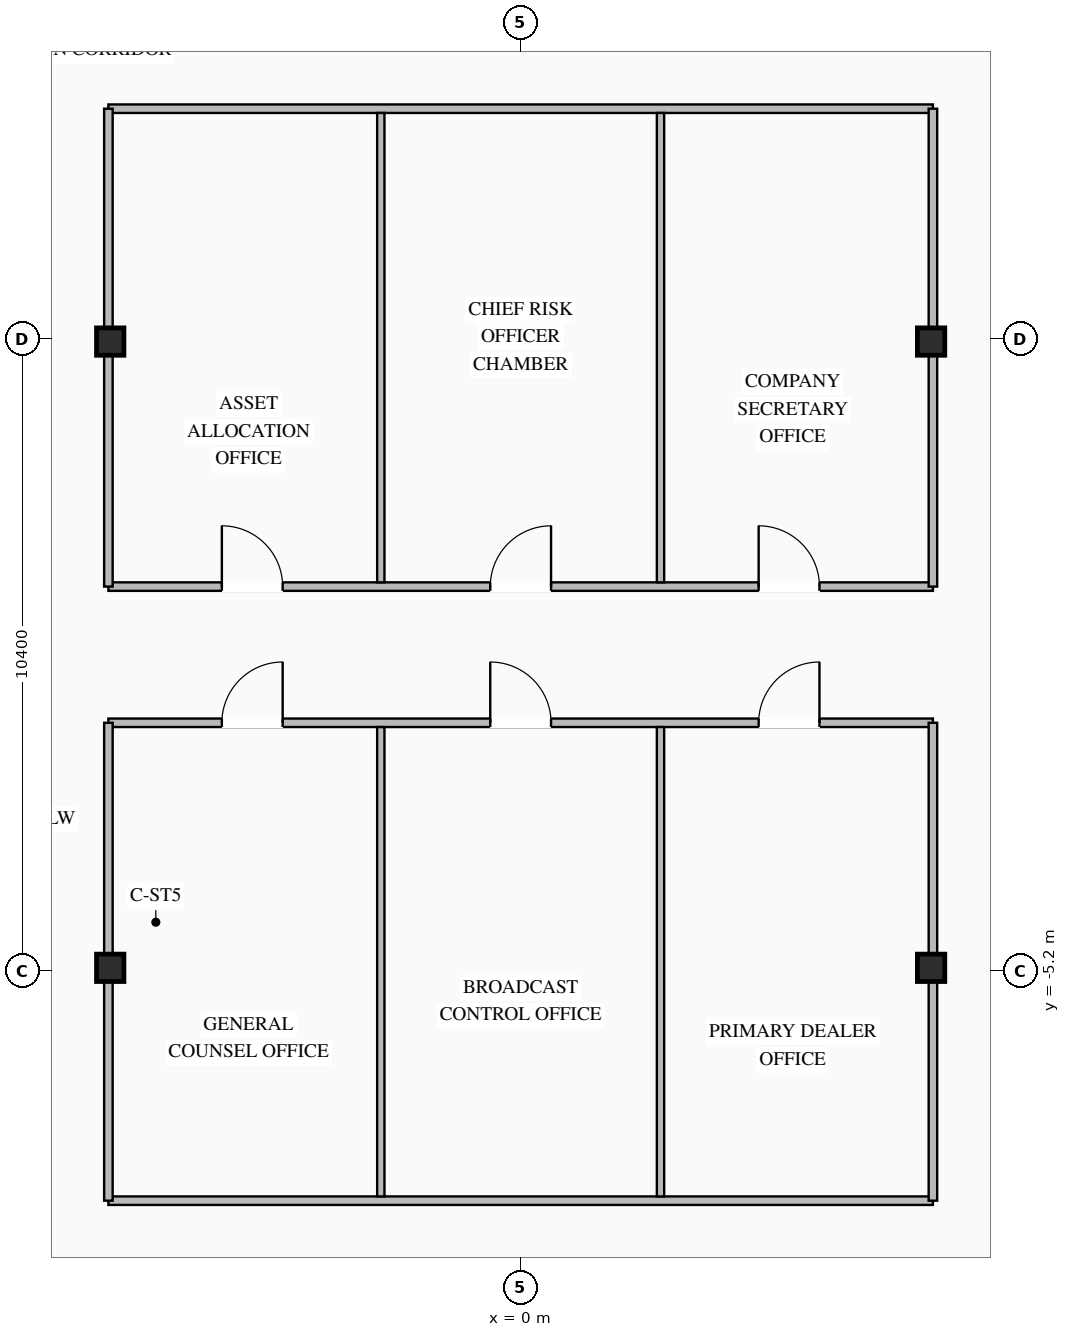
"""IFC4 building model, lengths in metres.
Left out: names, types, materials, properties, quantities, classifications, styles, units other than length and angle.
Written with IfcOpenShell. Run it as: python <this file> out.ifc"""

import sys

from ifc_helpers import new_model, si_unit, direction, frame, frame_2d, origin, origin_2d, place, context, subcontext, project, spatial, rectangle, i_section, extrude, element, fill, save


model = new_model("IFC4")
c1 = context("Model", 3, precision=1e-05, world=origin(), true_north=direction((0.0, 1.0)))
c2 = subcontext(c1, "Body", "Model", "MODEL_VIEW")
j1 = project(units=[si_unit("LENGTHUNIT", "METRE"), si_unit("PLANEANGLEUNIT", "RADIAN")], contexts=[c1])
p1 = place(None, origin())
s1 = spatial("IfcSite", under=j1, at=p1, CompositionType="ELEMENT")
p2 = place(p1, origin())
s2 = spatial("IfcBuilding", under=s1, at=p2, CompositionType="ELEMENT")
p3 = place(p2, frame((0.0, 0.0, 272.4)))
s3 = spatial("IfcBuildingStorey", under=s2, at=p3, CompositionType="ELEMENT", Elevation=272.4)
for number, where, z_axis, x_axis in (
    (1, (-6.75, -5.15, 0.0), (0.0, 0.0, 1.0), (1.0, 0.0, 0.0)),
    (2, (-6.75, 5.15, 0.0), (0.0, 0.0, 1.0), (1.0, 0.0, 0.0)),
    (3, (6.75, -5.15, 0.0), (0.0, 0.0, 1.0), (1.0, 0.0, 0.0)),
    (4, (6.75, 5.15, 0.0), (0.0, 0.0, 1.0), (1.0, 0.0, 0.0)),
):
    element("IfcColumn", number, at=place(p3, frame(where, z_axis=z_axis, x_axis=x_axis)), inside=s3, PredefinedType="COLUMN", context=c2, shape_type="SweptSolid", body=[
        extrude(i_section(OverallWidth=0.45, OverallDepth=0.45, WebThickness=0.022, FlangeThickness=0.032, at=origin_2d()), origin(), (0.0, 0.0, 1.0), 3.45),
    ])
p4 = place(p3, frame((-6.78, 1.12, 0.0), z_axis=(0.0, 0.0, 1.0), x_axis=(1.0, 0.0, 0.0)))
e5 = element("IfcWall", 5, at=p4, inside=s3, PredefinedType="STANDARD", context=c2, shape_type="SweptSolid", body=[
    extrude(rectangle(XDim=13.56, YDim=0.14, at=frame_2d((6.78, 0.0))), origin(), (0.0, 0.0, 1.0), 3.25),
])
p5 = place(p4, frame((1.866, 0.0, 0.0)))
e6 = element("IfcOpeningElement", 6, at=p5, cuts=e5, PredefinedType="OPENING", context=c2, shape_type="SweptSolid", body=[
    extrude(rectangle(XDim=1.0, YDim=2.08, at=frame_2d((0.5, 1.04))), frame((0.0, 0.08, 0.0), z_axis=(0.0, -1.0, 0.0), x_axis=(1.0, 0.0, 0.0)), (0.0, 0.0, 1.0), 0.16),
])
p6 = place(p4, frame((6.28, 0.0, 0.0)))
e7 = element("IfcOpeningElement", 7, at=p6, cuts=e5, PredefinedType="OPENING", context=c2, shape_type="SweptSolid", body=[
    extrude(rectangle(XDim=1.0, YDim=2.08, at=frame_2d((0.5, 1.04))), frame((0.0, 0.08, 0.0), z_axis=(0.0, -1.0, 0.0), x_axis=(1.0, 0.0, 0.0)), (0.0, 0.0, 1.0), 0.16),
])
p7 = place(p4, frame((10.694, 0.0, 0.0)))
e8 = element("IfcOpeningElement", 8, at=p7, cuts=e5, PredefinedType="OPENING", context=c2, shape_type="SweptSolid", body=[
    extrude(rectangle(XDim=1.0, YDim=2.08, at=frame_2d((0.5, 1.04))), frame((0.0, 0.08, 0.0), z_axis=(0.0, -1.0, 0.0), x_axis=(1.0, 0.0, 0.0)), (0.0, 0.0, 1.0), 0.16),
])
p8 = place(p3, frame((-6.78, 8.98, 0.0), z_axis=(0.0, 0.0, 1.0), x_axis=(1.0, 0.0, 0.0)))
e9 = element("IfcWall", 9, at=p8, inside=s3, PredefinedType="STANDARD", context=c2, shape_type="SweptSolid", body=[
    extrude(rectangle(XDim=13.56, YDim=0.14, at=frame_2d((6.78, 0.0))), origin(), (0.0, 0.0, 1.0), 3.25),
])
for number, where, z_axis, x_axis in (
    (10, (-6.78, 1.12, 0.0), (0.0, 0.0, 1.0), (0.0, 1.0, 0.0)),
    (11, (6.78, 1.12, 0.0), (0.0, 0.0, 1.0), (0.0, 1.0, 0.0)),
):
    element("IfcWall", number, at=place(p3, frame(where, z_axis=z_axis, x_axis=x_axis)), inside=s3, PredefinedType="STANDARD", context=c2, shape_type="SweptSolid", body=[
        extrude(rectangle(XDim=7.86, YDim=0.14, at=frame_2d((3.93, 0.0))), origin(), (0.0, 0.0, 1.0), 2.645),
    ])
for number, where, z_axis, x_axis in (
    (12, (-2.3, 1.19, 0.0), (0.0, 0.0, 1.0), (0.0, 1.0, 0.0)),
    (13, (2.3, 1.19, 0.0), (0.0, 0.0, 1.0), (0.0, 1.0, 0.0)),
):
    element("IfcWall", number, at=place(p3, frame(where, z_axis=z_axis, x_axis=x_axis)), inside=s3, PredefinedType="STANDARD", context=c2, shape_type="SweptSolid", body=[
        extrude(rectangle(XDim=7.72, YDim=0.12, at=frame_2d((3.86, 0.0))), origin(), (0.0, 0.0, 1.0), 3.25),
    ])
p9 = place(p3, frame((-6.78, -1.12, 0.0), z_axis=(0.0, 0.0, 1.0), x_axis=(1.0, 0.0, 0.0)))
e14 = element("IfcWall", 14, at=p9, inside=s3, PredefinedType="STANDARD", context=c2, shape_type="SweptSolid", body=[
    extrude(rectangle(XDim=13.56, YDim=0.14, at=frame_2d((6.78, 0.0))), origin(), (0.0, 0.0, 1.0), 3.25),
])
p10 = place(p9, frame((1.866, 0.0, 0.0)))
e15 = element("IfcOpeningElement", 15, at=p10, cuts=e14, PredefinedType="OPENING", context=c2, shape_type="SweptSolid", body=[
    extrude(rectangle(XDim=1.0, YDim=2.08, at=frame_2d((0.5, 1.04))), frame((0.0, 0.08, 0.0), z_axis=(0.0, -1.0, 0.0), x_axis=(1.0, 0.0, 0.0)), (0.0, 0.0, 1.0), 0.16),
])
p11 = place(p9, frame((6.28, 0.0, 0.0)))
e16 = element("IfcOpeningElement", 16, at=p11, cuts=e14, PredefinedType="OPENING", context=c2, shape_type="SweptSolid", body=[
    extrude(rectangle(XDim=1.0, YDim=2.08, at=frame_2d((0.5, 1.04))), frame((0.0, 0.08, 0.0), z_axis=(0.0, -1.0, 0.0), x_axis=(1.0, 0.0, 0.0)), (0.0, 0.0, 1.0), 0.16),
])
p12 = place(p9, frame((10.694, 0.0, 0.0)))
e17 = element("IfcOpeningElement", 17, at=p12, cuts=e14, PredefinedType="OPENING", context=c2, shape_type="SweptSolid", body=[
    extrude(rectangle(XDim=1.0, YDim=2.08, at=frame_2d((0.5, 1.04))), frame((0.0, 0.08, 0.0), z_axis=(0.0, -1.0, 0.0), x_axis=(1.0, 0.0, 0.0)), (0.0, 0.0, 1.0), 0.16),
])
p13 = place(p3, frame((-6.78, -8.98, 0.0), z_axis=(0.0, 0.0, 1.0), x_axis=(1.0, 0.0, 0.0)))
e18 = element("IfcWall", 18, at=p13, inside=s3, PredefinedType="STANDARD", context=c2, shape_type="SweptSolid", body=[
    extrude(rectangle(XDim=13.56, YDim=0.14, at=frame_2d((6.78, 0.0))), origin(), (0.0, 0.0, 1.0), 3.25),
])
for number, where, z_axis, x_axis in (
    (19, (-6.78, -8.98, 0.0), (0.0, 0.0, 1.0), (0.0, 1.0, 0.0)),
    (20, (6.78, -8.98, 0.0), (0.0, 0.0, 1.0), (0.0, 1.0, 0.0)),
):
    element("IfcWall", number, at=place(p3, frame(where, z_axis=z_axis, x_axis=x_axis)), inside=s3, PredefinedType="STANDARD", context=c2, shape_type="SweptSolid", body=[
        extrude(rectangle(XDim=7.86, YDim=0.14, at=frame_2d((3.93, 0.0))), origin(), (0.0, 0.0, 1.0), 2.645),
    ])
for number, where, z_axis, x_axis in (
    (21, (-2.3, -8.91, 0.0), (0.0, 0.0, 1.0), (0.0, 1.0, 0.0)),
    (22, (2.3, -8.91, 0.0), (0.0, 0.0, 1.0), (0.0, 1.0, 0.0)),
):
    element("IfcWall", number, at=place(p3, frame(where, z_axis=z_axis, x_axis=x_axis)), inside=s3, PredefinedType="STANDARD", context=c2, shape_type="SweptSolid", body=[
        extrude(rectangle(XDim=7.72, YDim=0.12, at=frame_2d((3.86, 0.0))), origin(), (0.0, 0.0, 1.0), 3.25),
    ])
p14 = place(p5, origin())
e23 = element("IfcDoor", 23, at=p14, inside=s3, OperationType="SINGLE_SWING_LEFT", PredefinedType="DOOR", context=c2, shape_type="SweptSolid", body=[
    extrude(rectangle(XDim=1.0, YDim=2.08, at=frame_2d((0.5, 1.04))), frame((0.0, 0.025, 0.0), z_axis=(0.0, -1.0, 0.0), x_axis=(1.0, 0.0, 0.0)), (0.0, 0.0, 1.0), 0.05),
])
fill(e6, e23)
p15 = place(p6, origin())
e24 = element("IfcDoor", 24, at=p15, inside=s3, OperationType="SINGLE_SWING_RIGHT", PredefinedType="DOOR", context=c2, shape_type="SweptSolid", body=[
    extrude(rectangle(XDim=1.0, YDim=2.08, at=frame_2d((0.5, 1.04))), frame((0.0, 0.025, 0.0), z_axis=(0.0, -1.0, 0.0), x_axis=(1.0, 0.0, 0.0)), (0.0, 0.0, 1.0), 0.05),
])
fill(e7, e24)
p16 = place(p7, origin())
e25 = element("IfcDoor", 25, at=p16, inside=s3, OperationType="SINGLE_SWING_LEFT", PredefinedType="DOOR", context=c2, shape_type="SweptSolid", body=[
    extrude(rectangle(XDim=1.0, YDim=2.08, at=frame_2d((0.5, 1.04))), frame((0.0, 0.025, 0.0), z_axis=(0.0, -1.0, 0.0), x_axis=(1.0, 0.0, 0.0)), (0.0, 0.0, 1.0), 0.05),
])
fill(e8, e25)
p17 = place(p10, origin())
e26 = element("IfcDoor", 26, at=p17, inside=s3, OperationType="SINGLE_SWING_RIGHT", PredefinedType="DOOR", context=c2, shape_type="SweptSolid", body=[
    extrude(rectangle(XDim=1.0, YDim=2.08, at=frame_2d((0.5, 1.04))), frame((0.0, 0.025, 0.0), z_axis=(0.0, -1.0, 0.0), x_axis=(1.0, 0.0, 0.0)), (0.0, 0.0, 1.0), 0.05),
])
fill(e15, e26)
p18 = place(p11, origin())
e27 = element("IfcDoor", 27, at=p18, inside=s3, OperationType="SINGLE_SWING_LEFT", PredefinedType="DOOR", context=c2, shape_type="SweptSolid", body=[
    extrude(rectangle(XDim=1.0, YDim=2.08, at=frame_2d((0.5, 1.04))), frame((0.0, 0.025, 0.0), z_axis=(0.0, -1.0, 0.0), x_axis=(1.0, 0.0, 0.0)), (0.0, 0.0, 1.0), 0.05),
])
fill(e16, e27)
p19 = place(p12, origin())
e28 = element("IfcDoor", 28, at=p19, inside=s3, OperationType="SINGLE_SWING_RIGHT", PredefinedType="DOOR", context=c2, shape_type="SweptSolid", body=[
    extrude(rectangle(XDim=1.0, YDim=2.08, at=frame_2d((0.5, 1.04))), frame((0.0, 0.025, 0.0), z_axis=(0.0, -1.0, 0.0), x_axis=(1.0, 0.0, 0.0)), (0.0, 0.0, 1.0), 0.05),
])
fill(e17, e28)
save(model, sys.argv[1])
